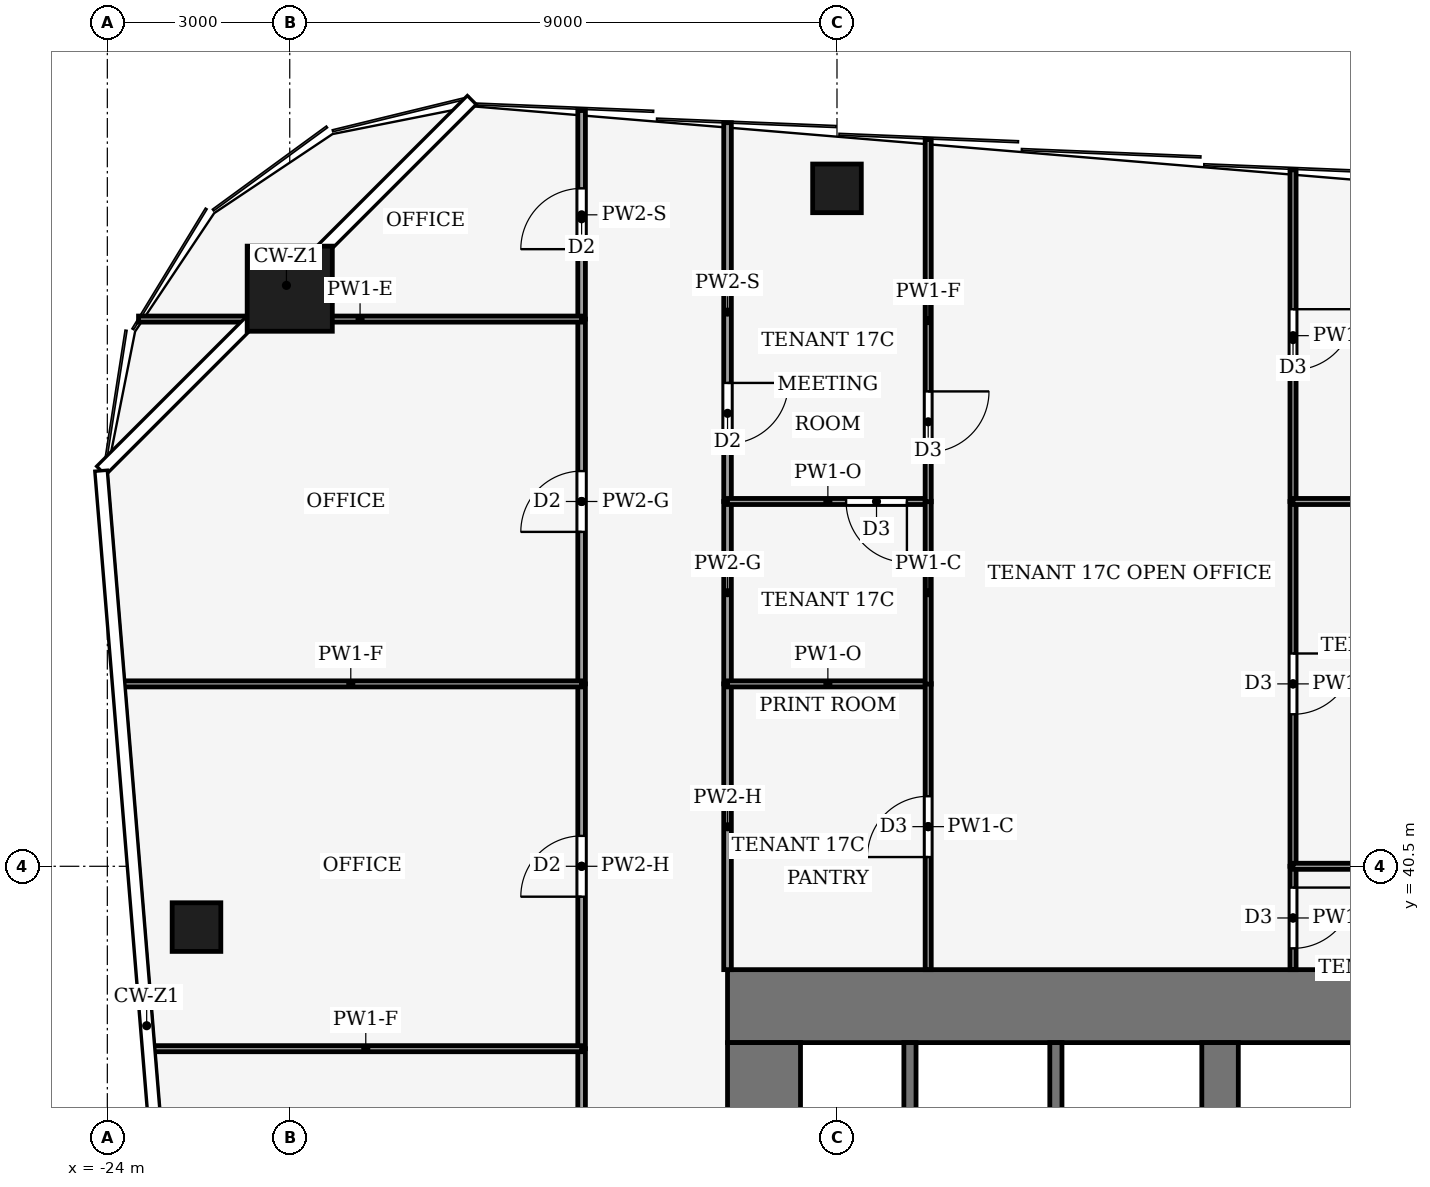
"""IFC4 building model, lengths in metres.
Left out: names, types, materials, properties, quantities, classifications, styles, units other than length and angle.
Written with IfcOpenShell. Run it as: python <this file> out.ifc"""

import sys

from ifc_helpers import new_model, si_unit, direction, frame, frame_2d, origin, origin_2d, place, context, subcontext, project, spatial, rectangle, hollow_rectangle, extrude, element, fill, save


model = new_model("IFC4")
c1 = context("Model", 3, precision=1e-05, world=origin(), true_north=direction((0.0, 1.0)))
c2 = subcontext(c1, "Body", "Model", "MODEL_VIEW")
j1 = project(units=[si_unit("LENGTHUNIT", "METRE"), si_unit("PLANEANGLEUNIT", "RADIAN")], contexts=[c1])
p1 = place(None, origin())
s1 = spatial("IfcSite", under=j1, at=p1, CompositionType="ELEMENT")
p2 = place(p1, origin())
s2 = spatial("IfcBuilding", under=s1, at=p2, CompositionType="ELEMENT")
p3 = place(p2, frame((0.0, 0.0, 78.0)))
s3 = spatial("IfcBuildingStorey", under=s2, at=p3, CompositionType="ELEMENT", Elevation=78.0)
p4 = place(p3, frame((-13.8, 38.2, -0.13), z_axis=(0.0, 0.0, 1.0), x_axis=(1.0, 0.0, 0.0)))
e1 = element("IfcWall", 1, at=p4, inside=s3, PredefinedType="SHEAR", context=c2, shape_type="SweptSolid", body=[
    extrude(rectangle(XDim=27.6, YDim=1.2, at=frame_2d((13.8, 0.0))), origin(), (0.0, 0.0, 1.0), 4.0),
])
p5 = place(p3, frame((-13.2, 18.4, -0.13), z_axis=(0.0, 0.0, 1.0), x_axis=(0.0, 1.0, 0.0)))
e2 = element("IfcWall", 2, at=p5, inside=s3, PredefinedType="SHEAR", context=c2, shape_type="SweptSolid", body=[
    extrude(rectangle(XDim=19.2, YDim=1.2, at=frame_2d((9.6, 0.0))), origin(), (0.0, 0.0, 1.0), 4.0),
])
p6 = place(p5, frame((2.8, 0.0, 0.13)))
e3 = element("IfcOpeningElement", 3, at=p6, cuts=e2, PredefinedType="OPENING", context=c2, shape_type="SweptSolid", body=[
    extrude(rectangle(XDim=2.4, YDim=2.4, at=frame_2d((1.2, 1.2))), frame((0.0, 0.61, 0.0), z_axis=(0.0, -1.0, 0.0), x_axis=(1.0, 0.0, 0.0)), (0.0, 0.0, 1.0), 1.22),
])
p7 = place(p5, frame((13.4, 0.0, 0.13)))
e4 = element("IfcOpeningElement", 4, at=p7, cuts=e2, PredefinedType="OPENING", context=c2, shape_type="SweptSolid", body=[
    extrude(rectangle(XDim=1.4, YDim=2.2, at=frame_2d((0.7, 1.1))), frame((0.0, 0.61, 0.0), z_axis=(0.0, -1.0, 0.0), x_axis=(1.0, 0.0, 0.0)), (0.0, 0.0, 1.0), 1.22),
])
p8 = place(p3, frame((-5.7, 18.4, -0.13), z_axis=(0.0, 0.0, 1.0), x_axis=(0.0, 1.0, 0.0)))
e5 = element("IfcWall", 5, at=p8, inside=s3, PredefinedType="SHEAR", context=c2, shape_type="SweptSolid", body=[
    extrude(rectangle(XDim=19.2, YDim=0.6, at=frame_2d((9.6, 0.0))), origin(), (0.0, 0.0, 1.0), 4.0),
])
p9 = place(p8, frame((8.35, 0.0, 0.13)))
e6 = element("IfcOpeningElement", 6, at=p9, cuts=e5, PredefinedType="OPENING", context=c2, shape_type="SweptSolid", body=[
    extrude(rectangle(XDim=0.9, YDim=2.1, at=frame_2d((0.45, 1.05))), frame((0.0, 0.31, 0.0), z_axis=(0.0, -1.0, 0.0), x_axis=(1.0, 0.0, 0.0)), (0.0, 0.0, 1.0), 0.62),
])
p10 = place(p3, frame((-21.0, 50.0, 0.0), z_axis=(0.0, 0.0, 1.0), x_axis=(1.0, 0.0, 0.0)))
e7 = element("IfcColumn", 7, at=p10, inside=s3, PredefinedType="COLUMN", context=c2, shape_type="SweptSolid", body=[
    extrude(hollow_rectangle(XDim=1.4, YDim=1.4, WallThickness=0.08, at=origin_2d()), origin(), (0.0, 0.0, 1.0), 4.0),
])
for number, where, z_axis, x_axis in (
    (8, (-12.0, 51.65, 0.0), (0.0, 0.0, 1.0), (1.0, 0.0, 0.0)),
    (9, (-22.534, 39.5, 0.0), (0.0, 0.0, 1.0), (1.0, 0.0, 0.0)),
):
    element("IfcColumn", number, at=place(p3, frame(where, z_axis=z_axis, x_axis=x_axis)), inside=s3, PredefinedType="COLUMN", context=c2, shape_type="SweptSolid", body=[
        extrude(hollow_rectangle(XDim=0.8, YDim=0.8, WallThickness=0.04, at=origin_2d()), origin(), (0.0, 0.0, 1.0), 4.0),
    ])
for number, where, z_axis, x_axis in (
    (10, (-10.8, 34.0, 0.0), (0.0, 0.0, 1.0), (0.0, 1.0, 0.0)),
    (11, (-8.4, 34.0, 0.0), (0.0, 0.0, 1.0), (0.0, 1.0, 0.0)),
):
    element("IfcWall", number, at=place(p3, frame(where, z_axis=z_axis, x_axis=x_axis)), inside=s3, PredefinedType="PARTITIONING", context=c2, shape_type="SweptSolid", body=[
        extrude(rectangle(XDim=3.6, YDim=0.2, at=frame_2d((1.8, 0.0))), origin(), (0.0, 0.0, 1.0), 3.87),
    ])
p11 = place(p3, frame((-16.2, 28.5, 0.0), z_axis=(0.0, 0.0, 1.0), x_axis=(0.0, 1.0, 0.0)))
e12 = element("IfcWall", 12, at=p11, inside=s3, PredefinedType="PARTITIONING", context=c2, shape_type="SweptSolid", body=[
    extrude(rectangle(XDim=9.0, YDim=0.125, at=frame_2d((4.5, 0.0))), origin(), (0.0, 0.0, 1.0), 3.48),
])
p12 = place(p11, frame((4.0, 0.0, 0.0)))
e13 = element("IfcOpeningElement", 13, at=p12, cuts=e12, PredefinedType="OPENING", context=c2, shape_type="SweptSolid", body=[
    extrude(rectangle(XDim=1.0, YDim=2.1, at=frame_2d((0.5, 1.05))), frame((0.0, 0.073, 0.0), z_axis=(0.0, -1.0, 0.0), x_axis=(1.0, 0.0, 0.0)), (0.0, 0.0, 1.0), 0.145),
])
p13 = place(p3, frame((-16.2, 37.5, 0.0), z_axis=(0.0, 0.0, 1.0), x_axis=(0.0, 1.0, 0.0)))
e14 = element("IfcWall", 14, at=p13, inside=s3, PredefinedType="PARTITIONING", context=c2, shape_type="SweptSolid", body=[
    extrude(rectangle(XDim=6.0, YDim=0.125, at=frame_2d((3.0, 0.0))), origin(), (0.0, 0.0, 1.0), 3.14),
])
p14 = place(p13, frame((2.5, 0.0, 0.0)))
e15 = element("IfcOpeningElement", 15, at=p14, cuts=e14, PredefinedType="OPENING", context=c2, shape_type="SweptSolid", body=[
    extrude(rectangle(XDim=1.0, YDim=2.1, at=frame_2d((0.5, 1.05))), frame((0.0, 0.073, 0.0), z_axis=(0.0, -1.0, 0.0), x_axis=(1.0, 0.0, 0.0)), (0.0, 0.0, 1.0), 0.145),
])
p15 = place(p3, frame((-16.2, 43.5, 0.0), z_axis=(0.0, 0.0, 1.0), x_axis=(0.0, 1.0, 0.0)))
e16 = element("IfcWall", 16, at=p15, inside=s3, PredefinedType="PARTITIONING", context=c2, shape_type="SweptSolid", body=[
    extrude(rectangle(XDim=6.0, YDim=0.125, at=frame_2d((3.0, 0.0))), origin(), (0.0, 0.0, 1.0), 3.87),
])
p16 = place(p15, frame((2.5, 0.0, 0.0)))
e17 = element("IfcOpeningElement", 17, at=p16, cuts=e16, PredefinedType="OPENING", context=c2, shape_type="SweptSolid", body=[
    extrude(rectangle(XDim=1.0, YDim=2.1, at=frame_2d((0.5, 1.05))), frame((0.0, 0.073, 0.0), z_axis=(0.0, -1.0, 0.0), x_axis=(1.0, 0.0, 0.0)), (0.0, 0.0, 1.0), 0.145),
])
p17 = place(p3, frame((-16.2, 49.5, 0.0), z_axis=(0.0, 0.0, 1.0), x_axis=(0.0, 1.0, 0.0)))
e18 = element("IfcWall", 18, at=p17, inside=s3, PredefinedType="PARTITIONING", context=c2, shape_type="SweptSolid", body=[
    extrude(rectangle(XDim=3.43, YDim=0.125, at=frame_2d((1.715, 0.0))), origin(), (0.0, 0.0, 1.0), 3.04),
])
p18 = place(p17, frame((1.15, 0.0, 0.0)))
e19 = element("IfcOpeningElement", 19, at=p18, cuts=e18, PredefinedType="OPENING", context=c2, shape_type="SweptSolid", body=[
    extrude(rectangle(XDim=1.0, YDim=2.1, at=frame_2d((0.5, 1.05))), frame((0.0, 0.073, 0.0), z_axis=(0.0, -1.0, 0.0), x_axis=(1.0, 0.0, 0.0)), (0.0, 0.0, 1.0), 0.145),
])
p19 = place(p3, frame((-13.8, 38.8, 0.0), z_axis=(0.0, 0.0, 1.0), x_axis=(0.0, 1.0, 0.0)))
e20 = element("IfcWall", 20, at=p19, inside=s3, PredefinedType="PARTITIONING", context=c2, shape_type="SweptSolid", body=[
    extrude(rectangle(XDim=4.7, YDim=0.125, at=frame_2d((2.35, 0.0))), origin(), (0.0, 0.0, 1.0), 3.14),
])
p20 = place(p3, frame((-13.8, 43.5, 0.0), z_axis=(0.0, 0.0, 1.0), x_axis=(0.0, 1.0, 0.0)))
e21 = element("IfcWall", 21, at=p20, inside=s3, PredefinedType="PARTITIONING", context=c2, shape_type="SweptSolid", body=[
    extrude(rectangle(XDim=3.0, YDim=0.125, at=frame_2d((1.5, 0.0))), origin(), (0.0, 0.0, 1.0), 3.87),
])
p21 = place(p3, frame((-13.8, 52.73, 0.0), z_axis=(0.0, 0.0, 1.0), x_axis=(0.0, -1.0, 0.0)))
e22 = element("IfcWall", 22, at=p21, inside=s3, PredefinedType="PARTITIONING", context=c2, shape_type="SweptSolid", body=[
    extrude(rectangle(XDim=6.23, YDim=0.125, at=frame_2d((3.115, 0.0))), origin(), (0.0, 0.0, 1.0), 3.04),
])
p22 = place(p21, frame((4.28, 0.0, 0.0)))
e23 = element("IfcOpeningElement", 23, at=p22, cuts=e22, PredefinedType="OPENING", context=c2, shape_type="SweptSolid", body=[
    extrude(rectangle(XDim=1.0, YDim=2.1, at=frame_2d((0.5, 1.05))), frame((0.0, 0.073, 0.0), z_axis=(0.0, -1.0, 0.0), x_axis=(1.0, 0.0, 0.0)), (0.0, 0.0, 1.0), 0.145),
])
p23 = place(p3, frame((-16.2, 37.5, 0.0), z_axis=(0.0, 0.0, 1.0), x_axis=(-1.0, 0.0, 0.0)))
e24 = element("IfcWall", 24, at=p23, inside=s3, PredefinedType="PARTITIONING", context=c2, shape_type="SweptSolid", body=[
    extrude(rectangle(XDim=7.099, YDim=0.1, at=frame_2d((3.55, 0.0))), origin(), (0.0, 0.0, 1.0), 3.04),
])
p24 = place(p3, frame((-16.2, 43.5, 0.0), z_axis=(0.0, 0.0, 1.0), x_axis=(-1.0, 0.0, 0.0)))
e25 = element("IfcWall", 25, at=p24, inside=s3, PredefinedType="PARTITIONING", context=c2, shape_type="SweptSolid", body=[
    extrude(rectangle(XDim=7.592, YDim=0.1, at=frame_2d((3.796, 0.0))), origin(), (0.0, 0.0, 1.0), 3.04),
])
p25 = place(p3, frame((-16.2, 49.5, 0.0), z_axis=(0.0, 0.0, 1.0), x_axis=(-1.0, 0.0, 0.0)))
e26 = element("IfcWall", 26, at=p25, inside=s3, PredefinedType="PARTITIONING", context=c2, shape_type="SweptSolid", body=[
    extrude(rectangle(XDim=7.287, YDim=0.1, at=frame_2d((3.644, 0.0))), origin(), (0.0, 0.0, 1.0), 3.34),
])
p26 = place(p3, frame((-10.5, 43.5, 0.0), z_axis=(0.0, 0.0, 1.0), x_axis=(-1.0, 0.0, 0.0)))
e27 = element("IfcWall", 27, at=p26, inside=s3, PredefinedType="PARTITIONING", context=c2, shape_type="SweptSolid", body=[
    extrude(rectangle(XDim=3.3, YDim=0.1, at=frame_2d((1.65, 0.0))), origin(), (0.0, 0.0, 1.0), 3.39),
])
p27 = place(p3, frame((-10.5, 38.8, 0.0), z_axis=(0.0, 0.0, 1.0), x_axis=(0.0, 1.0, 0.0)))
e28 = element("IfcWall", 28, at=p27, inside=s3, PredefinedType="PARTITIONING", context=c2, shape_type="SweptSolid", body=[
    extrude(rectangle(XDim=4.704, YDim=0.1, at=frame_2d((2.352, 0.0))), origin(), (0.0, 0.0, 1.0), 3.87),
])
p28 = place(p27, frame((1.852, 0.0, 0.0)))
e29 = element("IfcOpeningElement", 29, at=p28, cuts=e28, PredefinedType="OPENING", context=c2, shape_type="SweptSolid", body=[
    extrude(rectangle(XDim=1.0, YDim=2.1, at=frame_2d((0.5, 1.05))), frame((0.0, 0.06, 0.0), z_axis=(0.0, -1.0, 0.0), x_axis=(1.0, 0.0, 0.0)), (0.0, 0.0, 1.0), 0.12),
])
p29 = place(p3, frame((-10.5, 46.5, 0.0), z_axis=(0.0, 0.0, 1.0), x_axis=(-1.0, 0.0, 0.0)))
e30 = element("IfcWall", 30, at=p29, inside=s3, PredefinedType="PARTITIONING", context=c2, shape_type="SweptSolid", body=[
    extrude(rectangle(XDim=3.3, YDim=0.1, at=frame_2d((1.65, 0.0))), origin(), (0.0, 0.0, 1.0), 3.39),
])
p30 = place(p29, frame((0.35, 0.0, 0.0)))
e31 = element("IfcOpeningElement", 31, at=p30, cuts=e30, PredefinedType="OPENING", context=c2, shape_type="SweptSolid", body=[
    extrude(rectangle(XDim=1.0, YDim=2.1, at=frame_2d((0.5, 1.05))), frame((0.0, 0.06, 0.0), z_axis=(0.0, -1.0, 0.0), x_axis=(1.0, 0.0, 0.0)), (0.0, 0.0, 1.0), 0.12),
])
p31 = place(p3, frame((-10.5, 43.496, 0.0), z_axis=(0.0, 0.0, 1.0), x_axis=(0.0, 1.0, 0.0)))
e32 = element("IfcWall", 32, at=p31, inside=s3, PredefinedType="PARTITIONING", context=c2, shape_type="SweptSolid", body=[
    extrude(rectangle(XDim=3.008, YDim=0.1, at=frame_2d((1.504, 0.0))), origin(), (0.0, 0.0, 1.0), 3.87),
])
p32 = place(p3, frame((-10.5, 52.455, 0.0), z_axis=(0.0, 0.0, 1.0), x_axis=(0.0, -1.0, 0.0)))
e33 = element("IfcWall", 33, at=p32, inside=s3, PredefinedType="PARTITIONING", context=c2, shape_type="SweptSolid", body=[
    extrude(rectangle(XDim=5.959, YDim=0.1, at=frame_2d((2.979, 0.0))), origin(), (0.0, 0.0, 1.0), 3.04),
])
p33 = place(p32, frame((4.145, 0.0, 0.0)))
e34 = element("IfcOpeningElement", 34, at=p33, cuts=e33, PredefinedType="OPENING", context=c2, shape_type="SweptSolid", body=[
    extrude(rectangle(XDim=1.0, YDim=2.1, at=frame_2d((0.5, 1.05))), frame((0.0, 0.06, 0.0), z_axis=(0.0, -1.0, 0.0), x_axis=(1.0, 0.0, 0.0)), (0.0, 0.0, 1.0), 0.12),
])
p34 = place(p3, frame((-4.5, 40.5, 0.0), z_axis=(0.0, 0.0, 1.0), x_axis=(0.0, -1.0, 0.0)))
e35 = element("IfcWall", 35, at=p34, inside=s3, PredefinedType="PARTITIONING", context=c2, shape_type="SweptSolid", body=[
    extrude(rectangle(XDim=1.7, YDim=0.1, at=frame_2d((0.85, 0.0))), origin(), (0.0, 0.0, 1.0), 3.87),
])
p35 = place(p34, frame((0.35, 0.0, 0.0)))
e36 = element("IfcOpeningElement", 36, at=p35, cuts=e35, PredefinedType="OPENING", context=c2, shape_type="SweptSolid", body=[
    extrude(rectangle(XDim=1.0, YDim=2.1, at=frame_2d((0.5, 1.05))), frame((0.0, 0.06, 0.0), z_axis=(0.0, -1.0, 0.0), x_axis=(1.0, 0.0, 0.0)), (0.0, 0.0, 1.0), 0.12),
])
p36 = place(p3, frame((-4.5, 46.5, 0.0), z_axis=(0.0, 0.0, 1.0), x_axis=(0.0, -1.0, 0.0)))
e37 = element("IfcWall", 37, at=p36, inside=s3, PredefinedType="PARTITIONING", context=c2, shape_type="SweptSolid", body=[
    extrude(rectangle(XDim=6.0, YDim=0.1, at=frame_2d((3.0, 0.0))), origin(), (0.0, 0.0, 1.0), 3.87),
])
p37 = place(p36, frame((2.5, 0.0, 0.0)))
e38 = element("IfcOpeningElement", 38, at=p37, cuts=e37, PredefinedType="OPENING", context=c2, shape_type="SweptSolid", body=[
    extrude(rectangle(XDim=1.0, YDim=2.1, at=frame_2d((0.5, 1.05))), frame((0.0, 0.06, 0.0), z_axis=(0.0, -1.0, 0.0), x_axis=(1.0, 0.0, 0.0)), (0.0, 0.0, 1.0), 0.12),
])
p38 = place(p3, frame((-4.5, 51.955, 0.0), z_axis=(0.0, 0.0, 1.0), x_axis=(0.0, -1.0, 0.0)))
e39 = element("IfcWall", 39, at=p38, inside=s3, PredefinedType="PARTITIONING", context=c2, shape_type="SweptSolid", body=[
    extrude(rectangle(XDim=5.455, YDim=0.1, at=frame_2d((2.728, 0.0))), origin(), (0.0, 0.0, 1.0), 3.04),
])
p39 = place(p38, frame((2.292, 0.0, 0.0)))
e40 = element("IfcOpeningElement", 40, at=p39, cuts=e39, PredefinedType="OPENING", context=c2, shape_type="SweptSolid", body=[
    extrude(rectangle(XDim=1.0, YDim=2.1, at=frame_2d((0.5, 1.05))), frame((0.0, 0.06, 0.0), z_axis=(0.0, -1.0, 0.0), x_axis=(1.0, 0.0, 0.0)), (0.0, 0.0, 1.0), 0.12),
])
for number, where, z_axis, x_axis in (
    (41, (0.0, 40.5, 0.0), (0.0, 0.0, 1.0), (-1.0, 0.0, 0.0)),
    (42, (0.0, 46.5, 0.0), (0.0, 0.0, 1.0), (-1.0, 0.0, 0.0)),
):
    element("IfcWall", number, at=place(p3, frame(where, z_axis=z_axis, x_axis=x_axis)), inside=s3, PredefinedType="PARTITIONING", context=c2, shape_type="SweptSolid", body=[
        extrude(rectangle(XDim=4.5, YDim=0.1, at=frame_2d((2.25, 0.0))), origin(), (0.0, 0.0, 1.0), 3.39),
    ])
p40 = place(p14, origin())
e43 = element("IfcDoor", 43, at=p40, inside=s3, OperationType="SINGLE_SWING_RIGHT", PredefinedType="DOOR", context=c2, shape_type="SweptSolid", body=[
    extrude(rectangle(XDim=1.0, YDim=2.1, at=frame_2d((0.5, 1.05))), frame((0.0, 0.025, 0.0), z_axis=(0.0, -1.0, 0.0), x_axis=(1.0, 0.0, 0.0)), (0.0, 0.0, 1.0), 0.05),
])
fill(e15, e43)
p41 = place(p16, origin())
e44 = element("IfcDoor", 44, at=p41, inside=s3, OperationType="SINGLE_SWING_LEFT", PredefinedType="DOOR", context=c2, shape_type="SweptSolid", body=[
    extrude(rectangle(XDim=1.0, YDim=2.1, at=frame_2d((0.5, 1.05))), frame((0.0, 0.025, 0.0), z_axis=(0.0, -1.0, 0.0), x_axis=(1.0, 0.0, 0.0)), (0.0, 0.0, 1.0), 0.05),
])
fill(e17, e44)
p42 = place(p18, origin())
e45 = element("IfcDoor", 45, at=p42, inside=s3, OperationType="SINGLE_SWING_LEFT", PredefinedType="DOOR", context=c2, shape_type="SweptSolid", body=[
    extrude(rectangle(XDim=1.0, YDim=2.1, at=frame_2d((0.5, 1.05))), frame((0.0, 0.025, 0.0), z_axis=(0.0, -1.0, 0.0), x_axis=(1.0, 0.0, 0.0)), (0.0, 0.0, 1.0), 0.05),
])
fill(e19, e45)
p43 = place(p22, origin())
e46 = element("IfcDoor", 46, at=p43, inside=s3, OperationType="SINGLE_SWING_RIGHT", PredefinedType="DOOR", context=c2, shape_type="SweptSolid", body=[
    extrude(rectangle(XDim=1.0, YDim=2.1, at=frame_2d((0.5, 1.05))), frame((0.0, 0.025, 0.0), z_axis=(0.0, -1.0, 0.0), x_axis=(1.0, 0.0, 0.0)), (0.0, 0.0, 1.0), 0.05),
])
fill(e23, e46)
p44 = place(p28, origin())
e47 = element("IfcDoor", 47, at=p44, inside=s3, OperationType="SINGLE_SWING_RIGHT", PredefinedType="DOOR", context=c2, shape_type="SweptSolid", body=[
    extrude(rectangle(XDim=1.0, YDim=2.1, at=frame_2d((0.5, 1.05))), frame((0.0, 0.025, 0.0), z_axis=(0.0, -1.0, 0.0), x_axis=(1.0, 0.0, 0.0)), (0.0, 0.0, 1.0), 0.05),
])
fill(e29, e47)
p45 = place(p30, origin())
e48 = element("IfcDoor", 48, at=p45, inside=s3, OperationType="SINGLE_SWING_LEFT", PredefinedType="DOOR", context=c2, shape_type="SweptSolid", body=[
    extrude(rectangle(XDim=1.0, YDim=2.1, at=frame_2d((0.5, 1.05))), frame((0.0, 0.025, 0.0), z_axis=(0.0, -1.0, 0.0), x_axis=(1.0, 0.0, 0.0)), (0.0, 0.0, 1.0), 0.05),
])
fill(e31, e48)
p46 = place(p33, origin())
e49 = element("IfcDoor", 49, at=p46, inside=s3, OperationType="SINGLE_SWING_RIGHT", PredefinedType="DOOR", context=c2, shape_type="SweptSolid", body=[
    extrude(rectangle(XDim=1.0, YDim=2.1, at=frame_2d((0.5, 1.05))), frame((0.0, 0.025, 0.0), z_axis=(0.0, -1.0, 0.0), x_axis=(1.0, 0.0, 0.0)), (0.0, 0.0, 1.0), 0.05),
])
fill(e34, e49)
p47 = place(p35, origin())
e50 = element("IfcDoor", 50, at=p47, inside=s3, OperationType="SINGLE_SWING_LEFT", PredefinedType="DOOR", context=c2, shape_type="SweptSolid", body=[
    extrude(rectangle(XDim=1.0, YDim=2.1, at=frame_2d((0.5, 1.05))), frame((0.0, 0.025, 0.0), z_axis=(0.0, -1.0, 0.0), x_axis=(1.0, 0.0, 0.0)), (0.0, 0.0, 1.0), 0.05),
])
fill(e36, e50)
p48 = place(p37, origin())
e51 = element("IfcDoor", 51, at=p48, inside=s3, OperationType="SINGLE_SWING_RIGHT", PredefinedType="DOOR", context=c2, shape_type="SweptSolid", body=[
    extrude(rectangle(XDim=1.0, YDim=2.1, at=frame_2d((0.5, 1.05))), frame((0.0, 0.025, 0.0), z_axis=(0.0, -1.0, 0.0), x_axis=(1.0, 0.0, 0.0)), (0.0, 0.0, 1.0), 0.05),
])
fill(e38, e51)
p49 = place(p39, origin())
e52 = element("IfcDoor", 52, at=p49, inside=s3, OperationType="SINGLE_SWING_RIGHT", PredefinedType="DOOR", context=c2, shape_type="SweptSolid", body=[
    extrude(rectangle(XDim=1.0, YDim=2.1, at=frame_2d((0.5, 1.05))), frame((0.0, 0.025, 0.0), z_axis=(0.0, -1.0, 0.0), x_axis=(1.0, 0.0, 0.0)), (0.0, 0.0, 1.0), 0.05),
])
fill(e40, e52)
save(model, sys.argv[1])
